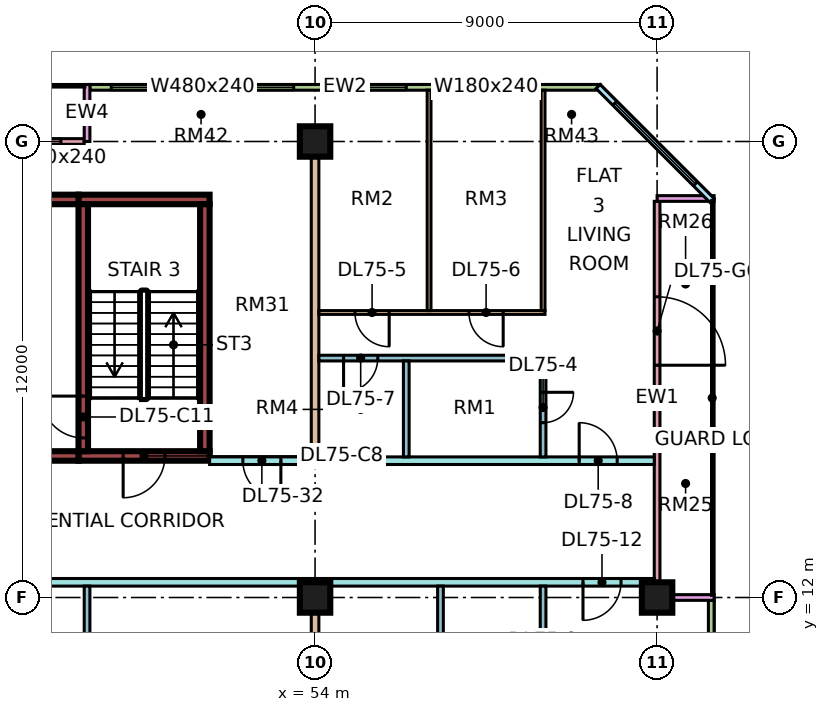
"""IFC4 building model, lengths in metres.
Left out: names, types, materials, properties, quantities, classifications, styles, units other than length and angle.
Written with IfcOpenShell. Run it as: python <this file> out.ifc"""

import sys

from ifc_helpers import new_model, si_unit, direction, frame, frame_2d, origin, origin_2d, place, context, subcontext, project, spatial, rectangle, extrude, element, fill, save


model = new_model("IFC4")
c1 = context("Model", 3, precision=1e-05, world=origin(), true_north=direction((0.0, 1.0)))
c2 = subcontext(c1, "Body", "Model", "MODEL_VIEW")
j1 = project(units=[si_unit("LENGTHUNIT", "METRE"), si_unit("PLANEANGLEUNIT", "RADIAN")], contexts=[c1])
p1 = place(None, origin())
s1 = spatial("IfcSite", under=j1, at=p1, CompositionType="ELEMENT")
p2 = place(p1, origin())
s2 = spatial("IfcBuilding", under=s1, at=p2, CompositionType="ELEMENT")
p3 = place(p2, frame((0.0, 0.0, 318.4)))
s3 = spatial("IfcBuildingStorey", under=s2, at=p3, CompositionType="ELEMENT", Elevation=318.4)
for number, where, z_axis, x_axis in (
    (1, (54.0, 12.0, 0.0), (0.0, 0.0, 1.0), (1.0, 0.0, 0.0)),
    (2, (54.0, 24.0, 0.0), (0.0, 0.0, 1.0), (1.0, 0.0, 0.0)),
    (3, (63.0, 12.0, 0.0), (0.0, 0.0, 1.0), (1.0, 0.0, 0.0)),
):
    element("IfcColumn", number, at=place(p3, frame(where, z_axis=z_axis, x_axis=x_axis)), inside=s3, PredefinedType="COLUMN", context=c2, shape_type="SweptSolid", body=[
        extrude(rectangle(XDim=0.8, YDim=0.8, at=origin_2d()), origin(), (0.0, 0.0, 1.0), 3.75),
    ])
p4 = place(p3, frame((47.775, 15.725, 0.0), z_axis=(0.0, 0.0, 1.0), x_axis=(1.0, 0.0, 0.0)))
e4 = element("IfcWall", 4, at=p4, inside=s3, PredefinedType="SHEAR", context=c2, shape_type="SweptSolid", body=[
    extrude(rectangle(XDim=3.45, YDim=0.25, at=frame_2d((1.725, 0.0))), origin(), (0.0, 0.0, 1.0), 3.75),
])
p5 = place(p4, frame((1.175, 0.0, 0.0)))
e5 = element("IfcOpeningElement", 5, at=p5, cuts=e4, PredefinedType="OPENING", context=c2, shape_type="SweptSolid", body=[
    extrude(rectangle(XDim=1.1, YDim=2.2, at=frame_2d((0.55, 1.1))), frame((0.0, 0.135, 0.0), z_axis=(0.0, -1.0, 0.0), x_axis=(1.0, 0.0, 0.0)), (0.0, 0.0, 1.0), 0.27),
])
p6 = place(p3, frame((47.775, 22.475, 0.0), z_axis=(0.0, 0.0, 1.0), x_axis=(1.0, 0.0, 0.0)))
e6 = element("IfcWall", 6, at=p6, inside=s3, PredefinedType="SHEAR", context=c2, shape_type="SweptSolid", body=[
    extrude(rectangle(XDim=3.45, YDim=0.25, at=frame_2d((1.725, 0.0))), origin(), (0.0, 0.0, 1.0), 3.75),
])
p7 = place(p3, frame((47.9, 15.85, 0.0), z_axis=(0.0, 0.0, 1.0), x_axis=(0.0, 1.0, 0.0)))
e7 = element("IfcWall", 7, at=p7, inside=s3, PredefinedType="SHEAR", context=c2, shape_type="SweptSolid", body=[
    extrude(rectangle(XDim=6.5, YDim=0.25, at=frame_2d((3.25, 0.0))), origin(), (0.0, 0.0, 1.0), 3.75),
])
p8 = place(p7, frame((0.35, 0.0, 0.0)))
e8 = element("IfcOpeningElement", 8, at=p8, cuts=e7, PredefinedType="OPENING", context=c2, shape_type="SweptSolid", body=[
    extrude(rectangle(XDim=1.1, YDim=2.2, at=frame_2d((0.55, 1.1))), frame((0.0, 0.135, 0.0), z_axis=(0.0, -1.0, 0.0), x_axis=(1.0, 0.0, 0.0)), (0.0, 0.0, 1.0), 0.27),
])
p9 = place(p3, frame((51.1, 15.85, 0.0), z_axis=(0.0, 0.0, 1.0), x_axis=(0.0, 1.0, 0.0)))
e9 = element("IfcWall", 9, at=p9, inside=s3, PredefinedType="SHEAR", context=c2, shape_type="SweptSolid", body=[
    extrude(rectangle(XDim=6.5, YDim=0.25, at=frame_2d((3.25, 0.0))), origin(), (0.0, 0.0, 1.0), 3.75),
])
p10 = place(p3, frame((44.35, 15.725, 0.0), z_axis=(0.0, 0.0, 1.0), x_axis=(1.0, 0.0, 0.0)))
e10 = element("IfcWall", 10, at=p10, inside=s3, PredefinedType="SHEAR", context=c2, shape_type="SweptSolid", body=[
    extrude(rectangle(XDim=3.425, YDim=0.25, at=frame_2d((1.712, 0.0))), origin(), (0.0, 0.0, 1.0), 3.75),
])
p11 = place(p10, frame((1.25, 0.0, 0.0)))
e11 = element("IfcOpeningElement", 11, at=p11, cuts=e10, PredefinedType="OPENING", context=c2, shape_type="SweptSolid", body=[
    extrude(rectangle(XDim=1.2, YDim=2.2, at=frame_2d((0.6, 1.1))), frame((0.0, 0.135, 0.0), z_axis=(0.0, -1.0, 0.0), x_axis=(1.0, 0.0, 0.0)), (0.0, 0.0, 1.0), 0.27),
])
p12 = place(p3, frame((44.35, 22.475, 0.0), z_axis=(0.0, 0.0, 1.0), x_axis=(1.0, 0.0, 0.0)))
e12 = element("IfcWall", 12, at=p12, inside=s3, PredefinedType="SHEAR", context=c2, shape_type="SweptSolid", body=[
    extrude(rectangle(XDim=3.425, YDim=0.25, at=frame_2d((1.712, 0.0))), origin(), (0.0, 0.0, 1.0), 3.75),
])
p13 = place(p3, frame((61.5, 25.425, 0.0), z_axis=(0.0, 0.0, 1.0), x_axis=(-1.0, 0.0, 0.0)))
e13 = element("IfcWall", 13, at=p13, inside=s3, PredefinedType="SOLIDWALL", context=c2, shape_type="SweptSolid", body=[
    extrude(rectangle(XDim=13.425, YDim=0.15, at=frame_2d((6.712, 0.0))), origin(), (0.0, 0.0, 1.0), 3.3),
])
p14 = place(p13, frame((2.1, 0.0, 0.45)))
e14 = element("IfcOpeningElement", 14, at=p14, cuts=e13, PredefinedType="OPENING", context=c2, shape_type="SweptSolid", body=[
    extrude(rectangle(XDim=1.8, YDim=2.4, at=frame_2d((0.9, 1.2))), frame((0.0, 0.085, 0.0), z_axis=(0.0, -1.0, 0.0), x_axis=(1.0, 0.0, 0.0)), (0.0, 0.0, 1.0), 0.17),
])
p15 = place(p13, frame((5.1, 0.0, 0.45)))
e15 = element("IfcOpeningElement", 15, at=p15, cuts=e13, PredefinedType="OPENING", context=c2, shape_type="SweptSolid", body=[
    extrude(rectangle(XDim=1.8, YDim=2.4, at=frame_2d((0.9, 1.2))), frame((0.0, 0.085, 0.0), z_axis=(0.0, -1.0, 0.0), x_axis=(1.0, 0.0, 0.0)), (0.0, 0.0, 1.0), 0.17),
])
p16 = place(p13, frame((8.062, 0.0, 0.45)))
e16 = element("IfcOpeningElement", 16, at=p16, cuts=e13, PredefinedType="OPENING", context=c2, shape_type="SweptSolid", body=[
    extrude(rectangle(XDim=4.8, YDim=2.4, at=frame_2d((2.4, 1.2))), frame((0.0, 0.085, 0.0), z_axis=(0.0, -1.0, 0.0), x_axis=(1.0, 0.0, 0.0)), (0.0, 0.0, 1.0), 0.17),
])
p17 = place(p3, frame((47.925, 24.0, 0.0), z_axis=(0.0, 0.0, 1.0), x_axis=(-1.0, 0.0, 0.0)))
e17 = element("IfcWall", 17, at=p17, inside=s3, PredefinedType="SOLIDWALL", context=c2, shape_type="SweptSolid", body=[
    extrude(rectangle(XDim=7.35, YDim=0.15, at=frame_2d((3.675, 0.0))), origin(), (0.0, 0.0, 1.0), 3.3),
])
p18 = place(p17, frame((0.613, 0.0, 0.45)))
e18 = element("IfcOpeningElement", 18, at=p18, cuts=e17, PredefinedType="OPENING", context=c2, shape_type="SweptSolid", body=[
    extrude(rectangle(XDim=1.2, YDim=2.4, at=frame_2d((0.6, 1.2))), frame((0.0, 0.085, 0.0), z_axis=(0.0, -1.0, 0.0), x_axis=(1.0, 0.0, 0.0)), (0.0, 0.0, 1.0), 0.17),
])
p19 = place(p17, frame((3.887, 0.0, 0.45)))
e19 = element("IfcOpeningElement", 19, at=p19, cuts=e17, PredefinedType="OPENING", context=c2, shape_type="SweptSolid", body=[
    extrude(rectangle(XDim=3.0, YDim=2.4, at=frame_2d((1.5, 1.2))), frame((0.0, 0.085, 0.0), z_axis=(0.0, -1.0, 0.0), x_axis=(1.0, 0.0, 0.0)), (0.0, 0.0, 1.0), 0.17),
])
p20 = place(p3, frame((48.0, 25.5, 0.0), z_axis=(0.0, 0.0, 1.0), x_axis=(0.0, -1.0, 0.0)))
e20 = element("IfcWall", 20, at=p20, inside=s3, PredefinedType="SOLIDWALL", context=c2, shape_type="SweptSolid", body=[
    extrude(rectangle(XDim=1.5, YDim=0.15, at=frame_2d((0.75, 0.0))), origin(), (0.0, 0.0, 1.0), 3.3),
])
p21 = place(p3, frame((64.425, 1.5, 0.0), z_axis=(0.0, 0.0, 1.0), x_axis=(0.0, 1.0, 0.0)))
e21 = element("IfcWall", 21, at=p21, inside=s3, PredefinedType="SOLIDWALL", context=c2, shape_type="SweptSolid", body=[
    extrude(rectangle(XDim=10.425, YDim=0.15, at=frame_2d((5.212, 0.0))), origin(), (0.0, 0.0, 1.0), 3.3),
])
p22 = place(p21, frame((0.75, 0.0, 0.45)))
e22 = element("IfcOpeningElement", 22, at=p22, cuts=e21, PredefinedType="OPENING", context=c2, shape_type="SweptSolid", body=[
    extrude(rectangle(XDim=3.0, YDim=2.4, at=frame_2d((1.5, 1.2))), frame((0.0, 0.085, 0.0), z_axis=(0.0, -1.0, 0.0), x_axis=(1.0, 0.0, 0.0)), (0.0, 0.0, 1.0), 0.17),
])
p23 = place(p3, frame((63.0, 12.075, 0.0), z_axis=(0.0, 0.0, 1.0), x_axis=(0.0, 1.0, 0.0)))
e23 = element("IfcWall", 23, at=p23, inside=s3, PredefinedType="SOLIDWALL", context=c2, shape_type="SweptSolid", body=[
    extrude(rectangle(XDim=10.35, YDim=0.15, at=frame_2d((5.175, 0.0))), origin(), (0.0, 0.0, 1.0), 3.3),
])
p24 = place(p23, frame((6.038, 0.0, 0.0)))
e24 = element("IfcOpeningElement", 24, at=p24, cuts=e23, PredefinedType="OPENING", context=c2, shape_type="SweptSolid", body=[
    extrude(rectangle(XDim=1.8, YDim=2.4, at=frame_2d((0.9, 1.2))), frame((0.0, 0.085, 0.0), z_axis=(0.0, -1.0, 0.0), x_axis=(1.0, 0.0, 0.0)), (0.0, 0.0, 1.0), 0.17),
])
for number, where, z_axis, x_axis in (
    (25, (64.5, 12.0, 0.0), (0.0, 0.0, 1.0), (-1.0, 0.0, 0.0)),
    (26, (64.5, 22.5, 0.0), (0.0, 0.0, 1.0), (-1.0, 0.0, 0.0)),
):
    element("IfcWall", number, at=place(p3, frame(where, z_axis=z_axis, x_axis=x_axis)), inside=s3, PredefinedType="SOLIDWALL", context=c2, shape_type="SweptSolid", body=[
        extrude(rectangle(XDim=1.5, YDim=0.15, at=frame_2d((0.75, 0.0))), origin(), (0.0, 0.0, 1.0), 3.3),
    ])
p25 = place(p3, frame((64.447, 22.447, 0.0), z_axis=(0.0, 0.0, 1.0), x_axis=(-0.707106781187, 0.707106781187, 0.0)))
e27 = element("IfcWall", 27, at=p25, inside=s3, PredefinedType="SOLIDWALL", context=c2, shape_type="SweptSolid", body=[
    extrude(rectangle(XDim=4.243, YDim=0.15, at=frame_2d((2.121, 0.0))), origin(), (0.0, 0.0, 1.0), 3.3),
])
p26 = place(p25, frame((0.621, 0.0, 0.45)))
e28 = element("IfcOpeningElement", 28, at=p26, cuts=e27, PredefinedType="OPENING", context=c2, shape_type="SweptSolid", body=[
    extrude(rectangle(XDim=3.0, YDim=2.4, at=frame_2d((1.5, 1.2))), frame((0.0, 0.085, 0.0), z_axis=(0.0, -1.0, 0.0), x_axis=(1.0, 0.0, 0.0)), (0.0, 0.0, 1.0), 0.17),
])
p27 = place(p3, frame((40.65, 12.4, 0.0), z_axis=(0.0, 0.0, 1.0), x_axis=(1.0, 0.0, 0.0)))
e29 = element("IfcWall", 29, at=p27, inside=s3, PredefinedType="PARTITIONING", context=c2, shape_type="SweptSolid", body=[
    extrude(rectangle(XDim=22.276, YDim=0.2, at=frame_2d((11.138, 0.0))), origin(), (0.0, 0.0, 1.0), 3.3),
])
p28 = place(p27, frame((20.4, 0.0, 0.0)))
e30 = element("IfcOpeningElement", 30, at=p28, cuts=e29, PredefinedType="OPENING", context=c2, shape_type="SweptSolid", body=[
    extrude(rectangle(XDim=1.0, YDim=2.1, at=frame_2d((0.5, 1.05))), frame((0.0, 0.11, 0.0), z_axis=(0.0, -1.0, 0.0), x_axis=(1.0, 0.0, 0.0)), (0.0, 0.0, 1.0), 0.22),
])
p29 = place(p27, frame((1.05, 0.0, 0.0)))
e31 = element("IfcOpeningElement", 31, at=p29, cuts=e29, PredefinedType="OPENING", context=c2, shape_type="SweptSolid", body=[
    extrude(rectangle(XDim=1.0, YDim=2.1, at=frame_2d((0.5, 1.05))), frame((0.0, 0.11, 0.0), z_axis=(0.0, -1.0, 0.0), x_axis=(1.0, 0.0, 0.0)), (0.0, 0.0, 1.0), 0.22),
])
p30 = place(p3, frame((48.0, 5.975, 0.0), z_axis=(0.0, 0.0, 1.0), x_axis=(0.0, 1.0, 0.0)))
e32 = element("IfcWall", 32, at=p30, inside=s3, PredefinedType="PARTITIONING", context=c2, shape_type="SweptSolid", body=[
    extrude(rectangle(XDim=6.325, YDim=0.15, at=frame_2d((3.163, 0.0))), origin(), (0.0, 0.0, 1.0), 3.3),
])
p31 = place(p3, frame((51.225, 15.6, 0.0), z_axis=(0.0, 0.0, 1.0), x_axis=(1.0, 0.0, 0.0)))
e33 = element("IfcWall", 33, at=p31, inside=s3, PredefinedType="PARTITIONING", context=c2, shape_type="SweptSolid", body=[
    extrude(rectangle(XDim=11.701, YDim=0.2, at=frame_2d((5.851, 0.0))), origin(), (0.0, 0.0, 1.0), 3.3),
])
p32 = place(p31, frame((9.725, 0.0, 0.0)))
e34 = element("IfcOpeningElement", 34, at=p32, cuts=e33, PredefinedType="OPENING", context=c2, shape_type="SweptSolid", body=[
    extrude(rectangle(XDim=1.0, YDim=2.1, at=frame_2d((0.5, 1.05))), frame((0.0, 0.11, 0.0), z_axis=(0.0, -1.0, 0.0), x_axis=(1.0, 0.0, 0.0)), (0.0, 0.0, 1.0), 0.22),
])
p33 = place(p31, frame((0.875, 0.0, 0.0)))
e35 = element("IfcOpeningElement", 35, at=p33, cuts=e33, PredefinedType="OPENING", context=c2, shape_type="SweptSolid", body=[
    extrude(rectangle(XDim=1.0, YDim=2.1, at=frame_2d((0.5, 1.05))), frame((0.0, 0.11, 0.0), z_axis=(0.0, -1.0, 0.0), x_axis=(1.0, 0.0, 0.0)), (0.0, 0.0, 1.0), 0.22),
])
p34 = place(p3, frame((54.0, 0.0, 0.0), z_axis=(0.0, 0.0, 1.0), x_axis=(0.0, 1.0, 0.0)))
e36 = element("IfcWall", 36, at=p34, inside=s3, PredefinedType="PARTITIONING", context=c2, shape_type="SweptSolid", body=[
    extrude(rectangle(XDim=12.3, YDim=0.2, at=frame_2d((6.15, 0.0))), origin(), (0.0, 0.0, 1.0), 3.3),
])
p35 = place(p3, frame((54.0, 15.7, 0.0), z_axis=(0.0, 0.0, 1.0), x_axis=(0.0, 1.0, 0.0)))
e37 = element("IfcWall", 37, at=p35, inside=s3, PredefinedType="PARTITIONING", context=c2, shape_type="SweptSolid", body=[
    extrude(rectangle(XDim=8.3, YDim=0.2, at=frame_2d((4.15, 0.0))), origin(), (0.0, 0.0, 1.0), 3.3),
])
p36 = place(p3, frame((54.1, 18.3, 0.0), z_axis=(0.0, 0.0, 1.0), x_axis=(1.0, 0.0, 0.0)))
e38 = element("IfcWall", 38, at=p36, inside=s3, PredefinedType="PARTITIONING", context=c2, shape_type="SweptSolid", body=[
    extrude(rectangle(XDim=5.975, YDim=0.15, at=frame_2d((2.987, 0.0))), origin(), (0.0, 0.0, 1.0), 3.3),
])
p37 = place(p36, frame((0.65, 0.0, 0.0)))
e39 = element("IfcOpeningElement", 39, at=p37, cuts=e38, PredefinedType="OPENING", context=c2, shape_type="SweptSolid", body=[
    extrude(rectangle(XDim=0.9, YDim=2.1, at=frame_2d((0.45, 1.05))), frame((0.0, 0.085, 0.0), z_axis=(0.0, -1.0, 0.0), x_axis=(1.0, 0.0, 0.0)), (0.0, 0.0, 1.0), 0.17),
])
p38 = place(p3, frame((54.1, 19.5, 0.0), z_axis=(0.0, 0.0, 1.0), x_axis=(1.0, 0.0, 0.0)))
e40 = element("IfcWall", 40, at=p38, inside=s3, PredefinedType="PARTITIONING", context=c2, shape_type="SweptSolid", body=[
    extrude(rectangle(XDim=5.95, YDim=0.1, at=frame_2d((2.975, 0.0))), origin(), (0.0, 0.0, 1.0), 3.3),
])
p39 = place(p38, frame((0.95, 0.0, 0.0)))
e41 = element("IfcOpeningElement", 41, at=p39, cuts=e40, PredefinedType="OPENING", context=c2, shape_type="SweptSolid", body=[
    extrude(rectangle(XDim=0.9, YDim=2.1, at=frame_2d((0.45, 1.05))), frame((0.0, 0.06, 0.0), z_axis=(0.0, -1.0, 0.0), x_axis=(1.0, 0.0, 0.0)), (0.0, 0.0, 1.0), 0.12),
])
p40 = place(p38, frame((3.95, 0.0, 0.0)))
e42 = element("IfcOpeningElement", 42, at=p40, cuts=e40, PredefinedType="OPENING", context=c2, shape_type="SweptSolid", body=[
    extrude(rectangle(XDim=0.9, YDim=2.1, at=frame_2d((0.45, 1.05))), frame((0.0, 0.06, 0.0), z_axis=(0.0, -1.0, 0.0), x_axis=(1.0, 0.0, 0.0)), (0.0, 0.0, 1.0), 0.12),
])
p41 = place(p3, frame((56.4, 15.7, 0.0), z_axis=(0.0, 0.0, 1.0), x_axis=(0.0, 1.0, 0.0)))
e43 = element("IfcWall", 43, at=p41, inside=s3, PredefinedType="PARTITIONING", context=c2, shape_type="SweptSolid", body=[
    extrude(rectangle(XDim=2.525, YDim=0.15, at=frame_2d((1.263, 0.0))), origin(), (0.0, 0.0, 1.0), 3.3),
])
p42 = place(p3, frame((57.0, 19.55, 0.0), z_axis=(0.0, 0.0, 1.0), x_axis=(0.0, 1.0, 0.0)))
e44 = element("IfcWall", 44, at=p42, inside=s3, PredefinedType="PARTITIONING", context=c2, shape_type="SweptSolid", body=[
    extrude(rectangle(XDim=5.801, YDim=0.1, at=frame_2d((2.9, 0.0))), origin(), (0.0, 0.0, 1.0), 3.3),
])
p43 = place(p3, frame((57.3, 7.075, 0.0), z_axis=(0.0, 0.0, 1.0), x_axis=(0.0, 1.0, 0.0)))
e45 = element("IfcWall", 45, at=p43, inside=s3, PredefinedType="PARTITIONING", context=c2, shape_type="SweptSolid", body=[
    extrude(rectangle(XDim=5.225, YDim=0.15, at=frame_2d((2.613, 0.0))), origin(), (0.0, 0.0, 1.0), 3.3),
])
p44 = place(p3, frame((60.0, 7.075, 0.0), z_axis=(0.0, 0.0, 1.0), x_axis=(0.0, 1.0, 0.0)))
e46 = element("IfcWall", 46, at=p44, inside=s3, PredefinedType="PARTITIONING", context=c2, shape_type="SweptSolid", body=[
    extrude(rectangle(XDim=5.225, YDim=0.15, at=frame_2d((2.613, 0.0))), origin(), (0.0, 0.0, 1.0), 3.3),
])
p45 = place(p44, frame((2.275, 0.0, 0.0)))
e47 = element("IfcOpeningElement", 47, at=p45, cuts=e46, PredefinedType="OPENING", context=c2, shape_type="SweptSolid", body=[
    extrude(rectangle(XDim=0.8, YDim=2.1, at=frame_2d((0.4, 1.05))), frame((0.0, 0.085, 0.0), z_axis=(0.0, -1.0, 0.0), x_axis=(1.0, 0.0, 0.0)), (0.0, 0.0, 1.0), 0.17),
])
p46 = place(p3, frame((60.0, 15.7, 0.0), z_axis=(0.0, 0.0, 1.0), x_axis=(0.0, 1.0, 0.0)))
e48 = element("IfcWall", 48, at=p46, inside=s3, PredefinedType="PARTITIONING", context=c2, shape_type="SweptSolid", body=[
    extrude(rectangle(XDim=2.525, YDim=0.15, at=frame_2d((1.263, 0.0))), origin(), (0.0, 0.0, 1.0), 3.3),
])
p47 = place(p46, frame((0.9, 0.0, 0.0)))
e49 = element("IfcOpeningElement", 49, at=p47, cuts=e48, PredefinedType="OPENING", context=c2, shape_type="SweptSolid", body=[
    extrude(rectangle(XDim=0.8, YDim=2.1, at=frame_2d((0.4, 1.05))), frame((0.0, 0.085, 0.0), z_axis=(0.0, -1.0, 0.0), x_axis=(1.0, 0.0, 0.0)), (0.0, 0.0, 1.0), 0.17),
])
p48 = place(p3, frame((60.0, 19.55, 0.0), z_axis=(0.0, 0.0, 1.0), x_axis=(0.0, 1.0, 0.0)))
e50 = element("IfcWall", 50, at=p48, inside=s3, PredefinedType="PARTITIONING", context=c2, shape_type="SweptSolid", body=[
    extrude(rectangle(XDim=5.8, YDim=0.1, at=frame_2d((2.9, 0.0))), origin(), (0.0, 0.0, 1.0), 3.3),
])
p49 = place(p14, origin())
e51 = element("IfcWindow", 51, at=p49, inside=s3, PartitioningType="SINGLE_PANEL", PredefinedType="WINDOW", context=c2, shape_type="SweptSolid", body=[
    extrude(rectangle(XDim=1.8, YDim=2.4, at=frame_2d((0.9, 1.2))), frame((0.0, 0.03, 0.0), z_axis=(0.0, -1.0, 0.0), x_axis=(1.0, 0.0, 0.0)), (0.0, 0.0, 1.0), 0.06),
])
fill(e14, e51)
p50 = place(p15, origin())
e52 = element("IfcWindow", 52, at=p50, inside=s3, PartitioningType="SINGLE_PANEL", PredefinedType="WINDOW", context=c2, shape_type="SweptSolid", body=[
    extrude(rectangle(XDim=1.8, YDim=2.4, at=frame_2d((0.9, 1.2))), frame((0.0, 0.03, 0.0), z_axis=(0.0, -1.0, 0.0), x_axis=(1.0, 0.0, 0.0)), (0.0, 0.0, 1.0), 0.06),
])
fill(e15, e52)
p51 = place(p16, origin())
e53 = element("IfcWindow", 53, at=p51, inside=s3, PartitioningType="SINGLE_PANEL", PredefinedType="WINDOW", context=c2, shape_type="SweptSolid", body=[
    extrude(rectangle(XDim=4.8, YDim=2.4, at=frame_2d((2.4, 1.2))), frame((0.0, 0.03, 0.0), z_axis=(0.0, -1.0, 0.0), x_axis=(1.0, 0.0, 0.0)), (0.0, 0.0, 1.0), 0.06),
])
fill(e16, e53)
p52 = place(p18, origin())
e54 = element("IfcWindow", 54, at=p52, inside=s3, PartitioningType="SINGLE_PANEL", PredefinedType="WINDOW", context=c2, shape_type="SweptSolid", body=[
    extrude(rectangle(XDim=1.2, YDim=2.4, at=frame_2d((0.6, 1.2))), frame((0.0, 0.03, 0.0), z_axis=(0.0, -1.0, 0.0), x_axis=(1.0, 0.0, 0.0)), (0.0, 0.0, 1.0), 0.06),
])
fill(e18, e54)
p53 = place(p24, frame((1.8, 0.0, 0.0), z_axis=(0.0, 0.0, 1.0), x_axis=(-1.0, 0.0, 0.0)))
e55 = element("IfcDoor", 55, at=p53, inside=s3, OperationType="DOUBLE_DOOR_SINGLE_SWING", PredefinedType="DOOR", context=c2, shape_type="SweptSolid", body=[
    extrude(rectangle(XDim=1.8, YDim=2.4, at=frame_2d((0.9, 1.2))), frame((0.0, 0.025, 0.0), z_axis=(0.0, -1.0, 0.0), x_axis=(1.0, 0.0, 0.0)), (0.0, 0.0, 1.0), 0.05),
])
fill(e24, e55)
p54 = place(p26, origin())
e56 = element("IfcWindow", 56, at=p54, inside=s3, PartitioningType="SINGLE_PANEL", PredefinedType="WINDOW", context=c2, shape_type="SweptSolid", body=[
    extrude(rectangle(XDim=3.0, YDim=2.4, at=frame_2d((1.5, 1.2))), frame((0.0, 0.03, 0.0), z_axis=(0.0, -1.0, 0.0), x_axis=(1.0, 0.0, 0.0)), (0.0, 0.0, 1.0), 0.06),
])
fill(e28, e56)
p55 = place(p5, frame((1.1, 0.0, 0.0), z_axis=(0.0, 0.0, 1.0), x_axis=(-1.0, 0.0, 0.0)))
e57 = element("IfcDoor", 57, at=p55, inside=s3, OperationType="SINGLE_SWING_LEFT", PredefinedType="DOOR", context=c2, shape_type="SweptSolid", body=[
    extrude(rectangle(XDim=1.1, YDim=2.2, at=frame_2d((0.55, 1.1))), frame((0.0, 0.025, 0.0), z_axis=(0.0, -1.0, 0.0), x_axis=(1.0, 0.0, 0.0)), (0.0, 0.0, 1.0), 0.05),
])
fill(e5, e57)
p56 = place(p8, frame((1.1, 0.0, 0.0), z_axis=(0.0, 0.0, 1.0), x_axis=(-1.0, 0.0, 0.0)))
e58 = element("IfcDoor", 58, at=p56, inside=s3, OperationType="SINGLE_SWING_RIGHT", PredefinedType="DOOR", context=c2, shape_type="SweptSolid", body=[
    extrude(rectangle(XDim=1.1, YDim=2.2, at=frame_2d((0.55, 1.1))), frame((0.0, 0.025, 0.0), z_axis=(0.0, -1.0, 0.0), x_axis=(1.0, 0.0, 0.0)), (0.0, 0.0, 1.0), 0.05),
])
fill(e8, e58)
p57 = place(p47, origin())
e59 = element("IfcDoor", 59, at=p57, inside=s3, OperationType="SINGLE_SWING_RIGHT", PredefinedType="DOOR", context=c2, shape_type="SweptSolid", body=[
    extrude(rectangle(XDim=0.8, YDim=2.1, at=frame_2d((0.4, 1.05))), frame((0.0, 0.025, 0.0), z_axis=(0.0, -1.0, 0.0), x_axis=(1.0, 0.0, 0.0)), (0.0, 0.0, 1.0), 0.05),
])
fill(e49, e59)
p58 = place(p39, origin())
e60 = element("IfcDoor", 60, at=p58, inside=s3, OperationType="SINGLE_SWING_RIGHT", PredefinedType="DOOR", context=c2, shape_type="SweptSolid", body=[
    extrude(rectangle(XDim=0.9, YDim=2.1, at=frame_2d((0.45, 1.05))), frame((0.0, 0.025, 0.0), z_axis=(0.0, -1.0, 0.0), x_axis=(1.0, 0.0, 0.0)), (0.0, 0.0, 1.0), 0.05),
])
fill(e41, e60)
p59 = place(p40, origin())
e61 = element("IfcDoor", 61, at=p59, inside=s3, OperationType="SINGLE_SWING_RIGHT", PredefinedType="DOOR", context=c2, shape_type="SweptSolid", body=[
    extrude(rectangle(XDim=0.9, YDim=2.1, at=frame_2d((0.45, 1.05))), frame((0.0, 0.025, 0.0), z_axis=(0.0, -1.0, 0.0), x_axis=(1.0, 0.0, 0.0)), (0.0, 0.0, 1.0), 0.05),
])
fill(e42, e61)
p60 = place(p37, frame((0.9, 0.0, 0.0), z_axis=(0.0, 0.0, 1.0), x_axis=(-1.0, 0.0, 0.0)))
e62 = element("IfcDoor", 62, at=p60, inside=s3, OperationType="SINGLE_SWING_LEFT", PredefinedType="DOOR", context=c2, shape_type="SweptSolid", body=[
    extrude(rectangle(XDim=0.9, YDim=2.1, at=frame_2d((0.45, 1.05))), frame((0.0, 0.025, 0.0), z_axis=(0.0, -1.0, 0.0), x_axis=(1.0, 0.0, 0.0)), (0.0, 0.0, 1.0), 0.05),
])
fill(e39, e62)
p61 = place(p32, origin())
e63 = element("IfcDoor", 63, at=p61, inside=s3, OperationType="SINGLE_SWING_LEFT", PredefinedType="DOOR", context=c2, shape_type="SweptSolid", body=[
    extrude(rectangle(XDim=1.0, YDim=2.1, at=frame_2d((0.5, 1.05))), frame((0.0, 0.025, 0.0), z_axis=(0.0, -1.0, 0.0), x_axis=(1.0, 0.0, 0.0)), (0.0, 0.0, 1.0), 0.05),
])
fill(e34, e63)
p62 = place(p28, frame((1.0, 0.0, 0.0), z_axis=(0.0, 0.0, 1.0), x_axis=(-1.0, 0.0, 0.0)))
e64 = element("IfcDoor", 64, at=p62, inside=s3, OperationType="SINGLE_SWING_LEFT", PredefinedType="DOOR", context=c2, shape_type="SweptSolid", body=[
    extrude(rectangle(XDim=1.0, YDim=2.1, at=frame_2d((0.5, 1.05))), frame((0.0, 0.025, 0.0), z_axis=(0.0, -1.0, 0.0), x_axis=(1.0, 0.0, 0.0)), (0.0, 0.0, 1.0), 0.05),
])
fill(e30, e64)
p63 = place(p33, origin())
e65 = element("IfcDoor", 65, at=p63, inside=s3, OperationType="SINGLE_SWING_RIGHT", PredefinedType="DOOR", context=c2, shape_type="SweptSolid", body=[
    extrude(rectangle(XDim=1.0, YDim=2.1, at=frame_2d((0.5, 1.05))), frame((0.0, 0.025, 0.0), z_axis=(0.0, -1.0, 0.0), x_axis=(1.0, 0.0, 0.0)), (0.0, 0.0, 1.0), 0.05),
])
fill(e35, e65)
save(model, sys.argv[1])
